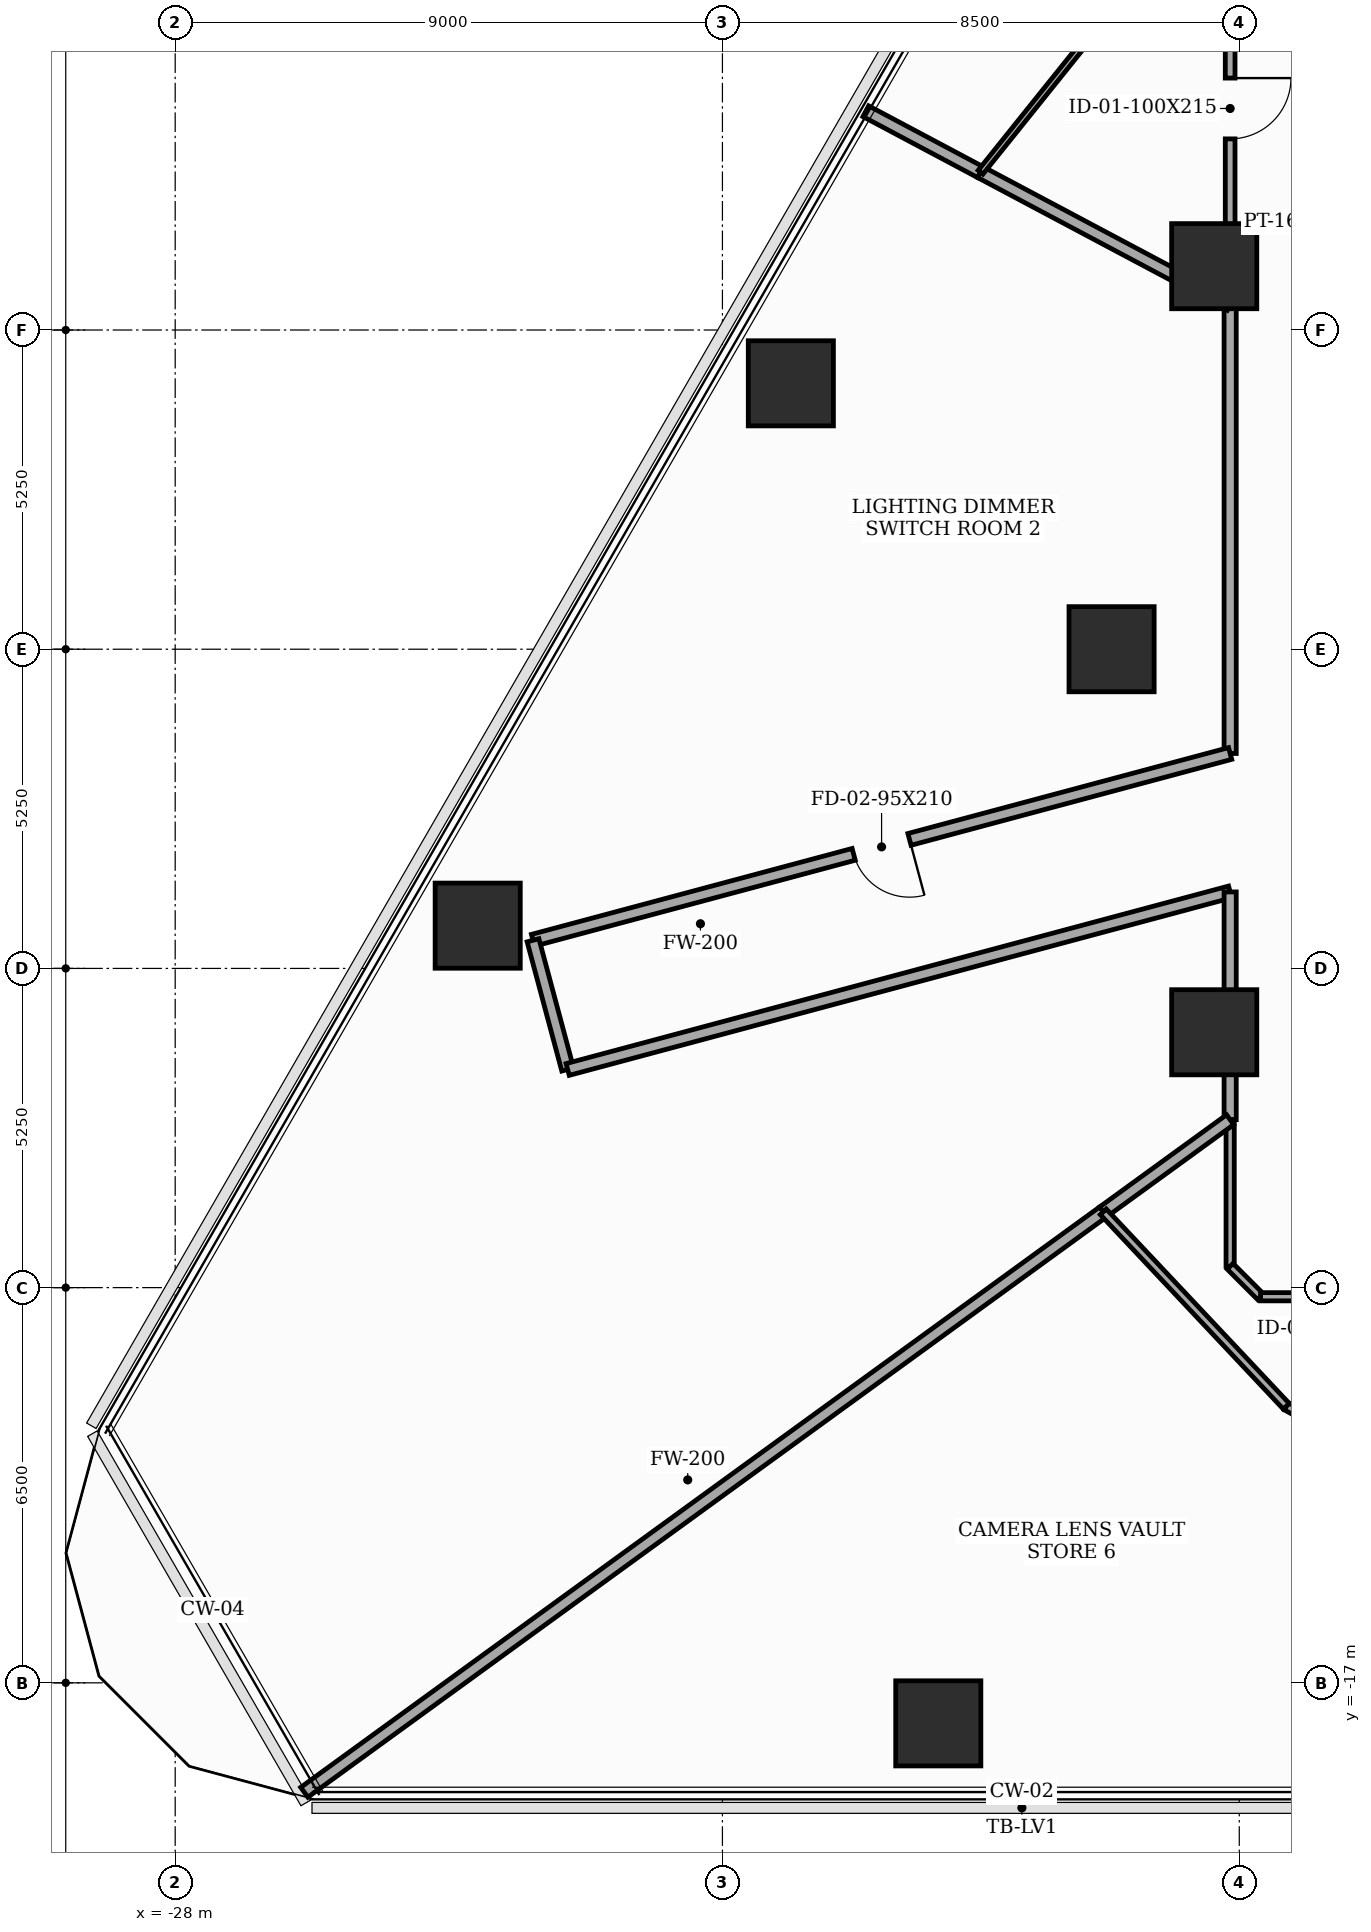
"""IFC4 building model, lengths in metres.
Left out: names, types, materials, properties, quantities, classifications, styles, units other than length and angle.
Written with IfcOpenShell. Run it as: python <this file> out.ifc"""

import sys

from ifc_helpers import new_model, si_unit, direction, frame, frame_2d, origin, origin_2d, place, context, subcontext, project, spatial, rectangle, extrude, element, fill, save


model = new_model("IFC4")
c1 = context("Model", 3, precision=1e-05, world=origin(), true_north=direction((0.0, 1.0)))
c2 = subcontext(c1, "Body", "Model", "MODEL_VIEW")
j1 = project(units=[si_unit("LENGTHUNIT", "METRE"), si_unit("PLANEANGLEUNIT", "RADIAN")], contexts=[c1])
p1 = place(None, origin())
s1 = spatial("IfcSite", under=j1, at=p1, CompositionType="ELEMENT")
p2 = place(p1, origin())
s2 = spatial("IfcBuilding", under=s1, at=p2, CompositionType="ELEMENT")
p3 = place(p2, frame((0.0, 0.0, 44.5)))
s3 = spatial("IfcBuildingStorey", under=s2, at=p3, CompositionType="ELEMENT", Elevation=44.5)
for number, where, z_axis, x_axis in (
    (1, (-10.912, 6.3, 0.0), (0.0, 0.0, 1.0), (1.0, 0.0, 0.0)),
    (2, (-12.6, 0.0, 0.0), (0.0, 0.0, 1.0), (1.0, 0.0, 0.0)),
    (3, (-10.912, -6.3, 0.0), (0.0, 0.0, 1.0), (1.0, 0.0, 0.0)),
    (4, (-15.45, -17.667, 0.0), (0.0, 0.0, 1.0), (1.0, 0.0, 0.0)),
    (5, (-17.875, 4.373, 0.0), (0.0, 0.0, 1.0), (1.0, 0.0, 0.0)),
    (6, (-23.025, -4.547, 0.0), (0.0, 0.0, 1.0), (1.0, 0.0, 0.0)),
):
    element("IfcColumn", number, at=place(p3, frame(where, z_axis=z_axis, x_axis=x_axis)), inside=s3, PredefinedType="COLUMN", context=c2, shape_type="SweptSolid", body=[
        extrude(rectangle(XDim=1.4, YDim=1.4, at=origin_2d()), origin(), (0.0, 0.0, 1.0), 3.7),
    ])
p4 = place(p3, frame((-10.65, 5.663, 0.0), z_axis=(0.0, 0.0, 1.0), x_axis=(0.0, -1.0, 0.0)))
e7 = element("IfcWall", 7, at=p4, inside=s3, PredefinedType="SOLIDWALL", context=c2, shape_type="SweptSolid", body=[
    extrude(rectangle(XDim=7.378, YDim=0.2, at=frame_2d((3.689, 0.0))), origin(), (0.0, 0.0, 1.0), 2.785),
])
p5 = place(p3, frame((-10.65, -1.715, 0.0), z_axis=(0.0, 0.0, 1.0), x_axis=(-0.965926659449, -0.258815935688, 0.0)))
e8 = element("IfcWall", 8, at=p5, inside=s3, PredefinedType="SOLIDWALL", context=c2, shape_type="SweptSolid", body=[
    extrude(rectangle(XDim=11.87, YDim=0.2, at=frame_2d((5.935, 0.0))), origin(), (0.0, 0.0, 1.0), 2.785),
])
p6 = place(p5, frame((5.46, 0.0, 0.0)))
e9 = element("IfcOpeningElement", 9, at=p6, cuts=e8, PredefinedType="OPENING", context=c2, shape_type="SweptSolid", body=[
    extrude(rectangle(XDim=0.95, YDim=2.1, at=frame_2d((0.475, 1.05))), frame((0.0, 0.11, 0.0), z_axis=(0.0, -1.0, 0.0), x_axis=(1.0, 0.0, 0.0)), (0.0, 0.0, 1.0), 0.22),
])
p7 = place(p3, frame((-22.115, -4.787, 0.0), z_axis=(0.0, 0.0, 1.0), x_axis=(0.259105843213, -0.965848933329, 0.0)))
e10 = element("IfcWall", 10, at=p7, inside=s3, PredefinedType="SOLIDWALL", context=c2, shape_type="SweptSolid", body=[
    extrude(rectangle(XDim=2.2, YDim=0.2, at=frame_2d((1.1, 0.0))), origin(), (0.0, 0.0, 1.0), 2.935),
])
p8 = place(p3, frame((-21.545, -6.912, 0.0), z_axis=(0.0, 0.0, 1.0), x_axis=(0.965906888357, 0.258889712088, 0.0)))
e11 = element("IfcWall", 11, at=p8, inside=s3, PredefinedType="SOLIDWALL", context=c2, shape_type="SweptSolid", body=[
    extrude(rectangle(XDim=11.28, YDim=0.2, at=frame_2d((5.64, 0.0))), origin(), (0.0, 0.0, 1.0), 2.785),
])
p9 = place(p3, frame((-10.65, -3.992, 0.0), z_axis=(0.0, 0.0, 1.0), x_axis=(0.0, -1.0, 0.0)))
e12 = element("IfcWall", 12, at=p9, inside=s3, PredefinedType="SOLIDWALL", context=c2, shape_type="SweptSolid", body=[
    extrude(rectangle(XDim=3.746, YDim=0.2, at=frame_2d((1.873, 0.0))), origin(), (0.0, 0.0, 1.0), 2.785),
])
p10 = place(p3, frame((-10.65, -7.738, 0.0), z_axis=(0.0, 0.0, 1.0), x_axis=(0.0, -1.0, 0.0)))
e13 = element("IfcWall", 13, at=p10, inside=s3, PredefinedType="PARTITIONING", context=c2, shape_type="SweptSolid", body=[
    extrude(rectangle(XDim=2.412, YDim=0.135, at=frame_2d((1.206, 0.0))), origin(), (0.0, 0.0, 1.0), 3.5),
])
p11 = place(p3, frame((-10.65, -10.15, 0.0), z_axis=(0.0, 0.0, 1.0), x_axis=(0.707106781187, -0.707106781187, 0.0)))
e14 = element("IfcWall", 14, at=p11, inside=s3, PredefinedType="PARTITIONING", context=c2, shape_type="SweptSolid", body=[
    extrude(rectangle(XDim=0.707, YDim=0.135, at=frame_2d((0.354, 0.0))), origin(), (0.0, 0.0, 1.0), 3.5),
])
p12 = place(p3, frame((-10.15, -10.65, 0.0), z_axis=(0.0, 0.0, 1.0), x_axis=(1.0, 0.0, 0.0)))
e15 = element("IfcWall", 15, at=p12, inside=s3, PredefinedType="PARTITIONING", context=c2, shape_type="SweptSolid", body=[
    extrude(rectangle(XDim=5.3, YDim=0.135, at=frame_2d((2.65, 0.0))), origin(), (0.0, 0.0, 1.0), 2.785),
])
p13 = place(p12, frame((0.585, 0.0, 0.0)))
e16 = element("IfcOpeningElement", 16, at=p13, cuts=e15, PredefinedType="OPENING", context=c2, shape_type="SweptSolid", body=[
    extrude(rectangle(XDim=0.95, YDim=2.1, at=frame_2d((0.475, 1.05))), frame((0.0, 0.077, 0.0), z_axis=(0.0, -1.0, 0.0), x_axis=(1.0, 0.0, 0.0)), (0.0, 0.0, 1.0), 0.155),
])
p14 = place(p3, frame((-10.65, 10.15, 0.0), z_axis=(0.0, 0.0, 1.0), x_axis=(0.0, -1.0, 0.0)))
e17 = element("IfcWall", 17, at=p14, inside=s3, PredefinedType="PARTITIONING", context=c2, shape_type="SweptSolid", body=[
    extrude(rectangle(XDim=4.487, YDim=0.16, at=frame_2d((2.243, 0.0))), origin(), (0.0, 0.0, 1.0), 2.785),
])
p15 = place(p14, frame((0.756, 0.0, 0.0)))
e18 = element("IfcOpeningElement", 18, at=p15, cuts=e17, PredefinedType="OPENING", context=c2, shape_type="SweptSolid", body=[
    extrude(rectangle(XDim=1.0, YDim=2.15, at=frame_2d((0.5, 1.075))), frame((0.0, 0.09, 0.0), z_axis=(0.0, -1.0, 0.0), x_axis=(1.0, 0.0, 0.0)), (0.0, 0.0, 1.0), 0.18),
])
p16 = place(p3, frame((-25.876, -18.8, 0.0), z_axis=(0.0, 0.0, 1.0), x_axis=(0.809014839236, 0.587788218575, 0.0)))
e19 = element("IfcWall", 19, at=p16, inside=s3, PredefinedType="SOLIDWALL", context=c2, shape_type="SweptSolid", body=[
    extrude(rectangle(XDim=16.242, YDim=0.2, at=frame_2d((8.121, 0.0))), origin(), (0.0, 0.0, 1.0), 2.935),
])
p17 = place(p3, frame((-12.736, -9.253, 0.0), z_axis=(0.0, 0.0, 1.0), x_axis=(0.809165833136, 0.587580338749, 0.0)))
e20 = element("IfcWall", 20, at=p17, inside=s3, PredefinedType="SOLIDWALL", context=c2, shape_type="SweptSolid", body=[
    extrude(rectangle(XDim=2.578, YDim=0.2, at=frame_2d((1.289, 0.0))), origin(), (0.0, 0.0, 1.0), 3.5),
])
p18 = place(p3, frame((-14.755, 7.845, 0.0), z_axis=(0.0, 0.0, 1.0), x_axis=(-0.882905636776, 0.469550462197, 0.0)))
e21 = element("IfcWall", 21, at=p18, inside=s3, PredefinedType="SOLIDWALL", context=c2, shape_type="SweptSolid", body=[
    extrude(rectangle(XDim=2.137, YDim=0.2, at=frame_2d((1.069, 0.0))), origin(), (0.0, 0.0, 1.0), 2.935),
])
p19 = place(p3, frame((-10.65, 5.663, 0.0), z_axis=(0.0, 0.0, 1.0), x_axis=(-0.883016425854, 0.46934208385, 0.0)))
e22 = element("IfcWall", 22, at=p19, inside=s3, PredefinedType="SOLIDWALL", context=c2, shape_type="SweptSolid", body=[
    extrude(rectangle(XDim=4.649, YDim=0.2, at=frame_2d((2.324, 0.0))), origin(), (0.0, 0.0, 1.0), 2.785),
])
p20 = place(p3, frame((-5.897, -14.596, 0.0), z_axis=(0.0, 0.0, 1.0), x_axis=(-0.87248894478, 0.488633851915, 0.0)))
e23 = element("IfcWall", 23, at=p20, inside=s3, PredefinedType="PARTITIONING", context=c2, shape_type="SweptSolid", body=[
    extrude(rectangle(XDim=4.39, YDim=0.135, at=frame_2d((2.195, 0.0))), origin(), (0.0, 0.0, 1.0), 2.685),
])
p21 = place(p3, frame((-9.727, -12.451, 0.0), z_axis=(0.0, 0.0, 1.0), x_axis=(-0.685262368975, 0.728296289752, 0.0)))
e24 = element("IfcWall", 24, at=p21, inside=s3, PredefinedType="PARTITIONING", context=c2, shape_type="SweptSolid", body=[
    extrude(rectangle(XDim=4.391, YDim=0.135, at=frame_2d((2.196, 0.0))), origin(), (0.0, 0.0, 1.0), 3.5),
])
p22 = place(p3, frame((-14.755, 7.845, 0.0), z_axis=(0.0, 0.0, 1.0), x_axis=(0.625893000506, 0.779908938222, 0.0)))
e25 = element("IfcWall", 25, at=p22, inside=s3, PredefinedType="MOVABLE", context=c2, shape_type="SweptSolid", body=[
    extrude(rectangle(XDim=6.681, YDim=0.1, at=frame_2d((3.341, 0.0))), origin(), (0.0, 0.0, 1.0), 2.685),
])
p23 = place(p6, origin())
e26 = element("IfcDoor", 26, at=p23, inside=s3, OperationType="SINGLE_SWING_LEFT", PredefinedType="DOOR", context=c2, shape_type="SweptSolid", body=[
    extrude(rectangle(XDim=0.95, YDim=2.1, at=frame_2d((0.475, 1.05))), frame((0.0, 0.025, 0.0), z_axis=(0.0, -1.0, 0.0), x_axis=(1.0, 0.0, 0.0)), (0.0, 0.0, 1.0), 0.05),
])
fill(e9, e26)
p24 = place(p15, origin())
e27 = element("IfcDoor", 27, at=p24, inside=s3, OperationType="SINGLE_SWING_LEFT", PredefinedType="DOOR", context=c2, shape_type="SweptSolid", body=[
    extrude(rectangle(XDim=1.0, YDim=2.15, at=frame_2d((0.5, 1.075))), frame((0.0, 0.025, 0.0), z_axis=(0.0, -1.0, 0.0), x_axis=(1.0, 0.0, 0.0)), (0.0, 0.0, 1.0), 0.05),
])
fill(e18, e27)
save(model, sys.argv[1])
